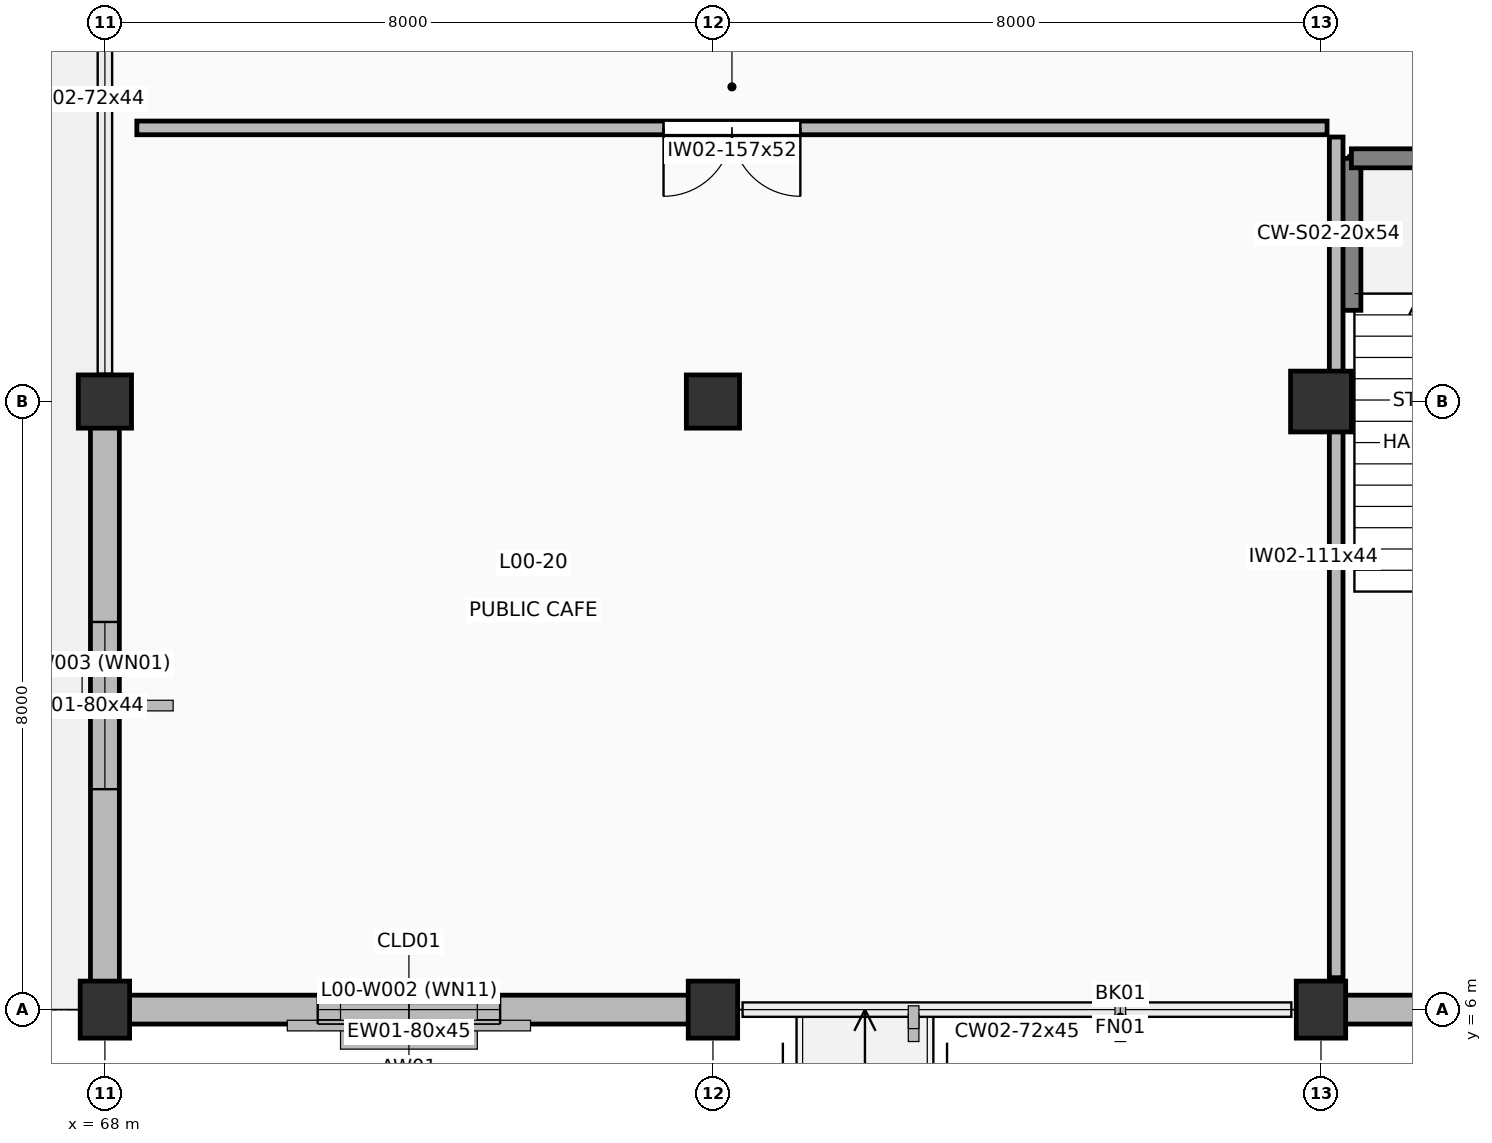
"""IFC4 building model, lengths in metres.
Left out: names, types, materials, properties, quantities, classifications, styles, units other than length and angle.
Written with IfcOpenShell. Run it as: python <this file> out.ifc"""

import sys

from ifc_helpers import new_model, si_unit, direction, frame, frame_2d, origin, origin_2d, place, context, subcontext, project, spatial, rectangle, extrude, element, fill, save


model = new_model("IFC4")
c1 = context("Model", 3, precision=1e-05, world=origin(), true_north=direction((0.0, 1.0)))
c2 = subcontext(c1, "Body", "Model", "MODEL_VIEW")
j1 = project(units=[si_unit("LENGTHUNIT", "METRE"), si_unit("PLANEANGLEUNIT", "RADIAN")], contexts=[c1])
p1 = place(None, origin())
s1 = spatial("IfcSite", under=j1, at=p1, CompositionType="ELEMENT")
p2 = place(p1, origin())
s2 = spatial("IfcBuilding", under=s1, at=p2, CompositionType="ELEMENT")
p3 = place(p2, origin())
s3 = spatial("IfcBuildingStorey", under=s2, at=p3, CompositionType="ELEMENT", Elevation=0.0)
p4 = place(p3, frame((68.0, 6.0, 0.0), z_axis=(0.0, 0.0, 1.0), x_axis=(1.0, 0.0, 0.0)))
e1 = element("IfcColumn", 1, at=p4, inside=s3, PredefinedType="PILASTER", context=c2, shape_type="SweptSolid", body=[
    extrude(rectangle(XDim=0.65, YDim=0.75, at=origin_2d()), origin(), (0.0, 0.0, 1.0), 5.4),
])
p5 = place(p3, frame((68.0, 14.0, 0.0), z_axis=(0.0, 0.0, 1.0), x_axis=(1.0, 0.0, 0.0)))
e2 = element("IfcColumn", 2, at=p5, inside=s3, PredefinedType="COLUMN", context=c2, shape_type="SweptSolid", body=[
    extrude(rectangle(XDim=0.7, YDim=0.7, at=origin_2d()), origin(), (0.0, 0.0, 1.0), 5.4),
])
p6 = place(p3, frame((76.0, 6.0, 0.0), z_axis=(0.0, 0.0, 1.0), x_axis=(1.0, 0.0, 0.0)))
e3 = element("IfcColumn", 3, at=p6, inside=s3, PredefinedType="PILASTER", context=c2, shape_type="SweptSolid", body=[
    extrude(rectangle(XDim=0.65, YDim=0.75, at=origin_2d()), origin(), (0.0, 0.0, 1.0), 5.4),
])
p7 = place(p3, frame((76.0, 14.0, 0.0), z_axis=(0.0, 0.0, 1.0), x_axis=(1.0, 0.0, 0.0)))
e4 = element("IfcColumn", 4, at=p7, inside=s3, PredefinedType="COLUMN", context=c2, shape_type="SweptSolid", body=[
    extrude(rectangle(XDim=0.7, YDim=0.7, at=origin_2d()), origin(), (0.0, 0.0, 1.0), 5.4),
])
p8 = place(p3, frame((84.0, 6.0, 0.0), z_axis=(0.0, 0.0, 1.0), x_axis=(1.0, 0.0, 0.0)))
e5 = element("IfcColumn", 5, at=p8, inside=s3, PredefinedType="PILASTER", context=c2, shape_type="SweptSolid", body=[
    extrude(rectangle(XDim=0.65, YDim=0.75, at=origin_2d()), origin(), (0.0, 0.0, 1.0), 5.4),
])
p9 = place(p3, frame((84.0, 14.0, 0.0), z_axis=(0.0, 0.0, 1.0), x_axis=(1.0, 0.0, 0.0)))
e6 = element("IfcColumn", 6, at=p9, inside=s3, PredefinedType="COLUMN", context=c2, shape_type="SweptSolid", body=[
    extrude(rectangle(XDim=0.8, YDim=0.8, at=origin_2d()), origin(), (0.0, 0.0, 1.0), 5.4),
])
p10 = place(p3, frame((91.077, 6.0, 0.0), z_axis=(0.0, 0.0, 1.0), x_axis=(-1.0, 0.0, 0.0)))
e7 = element("IfcWall", 7, at=p10, inside=s3, PredefinedType="SOLIDWALL", context=c2, shape_type="SweptSolid", body=[
    extrude(rectangle(XDim=7.077, YDim=0.38, at=frame_2d((3.539, 0.0))), origin(), (0.0, 0.0, 1.0), 4.495),
])
p11 = place(p10, frame((2.738, 0.0, 0.85)))
e8 = element("IfcOpeningElement", 8, at=p11, cuts=e7, PredefinedType="OPENING", context=c2, shape_type="SweptSolid", body=[
    extrude(rectangle(XDim=1.6, YDim=2.0, at=frame_2d((0.8, 1.0))), frame((0.0, 0.2, 0.0), z_axis=(0.0, -1.0, 0.0), x_axis=(1.0, 0.0, 0.0)), (0.0, 0.0, 1.0), 0.4),
])
p12 = place(p3, frame((76.0, 6.0, 0.0), z_axis=(0.0, 0.0, 1.0), x_axis=(-1.0, 0.0, 0.0)))
e9 = element("IfcWall", 9, at=p12, inside=s3, PredefinedType="SOLIDWALL", context=c2, shape_type="SweptSolid", body=[
    extrude(rectangle(XDim=8.0, YDim=0.38, at=frame_2d((4.0, 0.0))), origin(), (0.0, 0.0, 1.0), 4.495),
])
p13 = place(p12, frame((2.8, 0.0, 0.9)))
e10 = element("IfcOpeningElement", 10, at=p13, cuts=e9, PredefinedType="OPENING", context=c2, shape_type="SweptSolid", body=[
    extrude(rectangle(XDim=2.4, YDim=2.7, at=frame_2d((1.2, 1.35))), frame((0.0, 0.2, 0.0), z_axis=(0.0, -1.0, 0.0), x_axis=(1.0, 0.0, 0.0)), (0.0, 0.0, 1.0), 0.4),
])
p14 = place(p3, frame((68.0, 6.0, 0.0), z_axis=(0.0, 0.0, 1.0), x_axis=(0.0, 1.0, 0.0)))
e11 = element("IfcWall", 11, at=p14, inside=s3, PredefinedType="SOLIDWALL", context=c2, shape_type="SweptSolid", body=[
    extrude(rectangle(XDim=8.0, YDim=0.38, at=frame_2d((4.0, 0.0))), origin(), (0.0, 0.0, 1.0), 4.445),
])
p15 = place(p14, frame((2.9, 0.0, 0.85)))
e12 = element("IfcOpeningElement", 12, at=p15, cuts=e11, PredefinedType="OPENING", context=c2, shape_type="SweptSolid", body=[
    extrude(rectangle(XDim=2.2, YDim=2.8, at=frame_2d((1.1, 1.4))), frame((0.0, 0.2, 0.0), z_axis=(0.0, -1.0, 0.0), x_axis=(1.0, 0.0, 0.0)), (0.0, 0.0, 1.0), 0.4),
])
p16 = place(p3, frame((84.4, 15.2, 0.0), z_axis=(0.0, 0.0, 1.0), x_axis=(0.0, 1.0, 0.0)))
e13 = element("IfcWall", 13, at=p16, inside=s3, PredefinedType="SHEAR", context=c2, shape_type="SweptSolid", body=[
    extrude(rectangle(XDim=2.0, YDim=0.25, at=frame_2d((1.0, 0.0))), origin(), (0.0, 0.0, 1.0), 5.4),
])
p17 = place(p3, frame((84.4, 17.2, 0.0), z_axis=(0.0, 0.0, 1.0), x_axis=(1.0, 0.0, 0.0)))
e14 = element("IfcWall", 14, at=p17, inside=s3, PredefinedType="SHEAR", context=c2, shape_type="SweptSolid", body=[
    extrude(rectangle(XDim=4.8, YDim=0.25, at=frame_2d((2.4, 0.0))), origin(), (0.0, 0.0, 1.0), 5.4),
])
p18 = place(p3, frame((84.08, 17.6, 0.0), z_axis=(0.0, 0.0, 1.0), x_axis=(-1.0, 0.0, 0.0)))
e15 = element("IfcWall", 15, at=p18, inside=s3, PredefinedType="PARTITIONING", context=c2, shape_type="SweptSolid", body=[
    extrude(rectangle(XDim=15.66, YDim=0.18, at=frame_2d((7.83, 0.0))), origin(), (0.0, 0.0, 1.0), 5.16),
])
p19 = place(p18, frame((6.93, 0.0, 0.0)))
e16 = element("IfcOpeningElement", 16, at=p19, cuts=e15, PredefinedType="OPENING", context=c2, shape_type="SweptSolid", body=[
    extrude(rectangle(XDim=1.8, YDim=2.3, at=frame_2d((0.9, 1.15))), frame((0.0, 0.1, 0.0), z_axis=(0.0, -1.0, 0.0), x_axis=(1.0, 0.0, 0.0)), (0.0, 0.0, 1.0), 0.2),
])
p20 = place(p3, frame((84.2, 6.42, 0.0), z_axis=(0.0, 0.0, 1.0), x_axis=(0.0, 1.0, 0.0)))
e17 = element("IfcWall", 17, at=p20, inside=s3, PredefinedType="PARTITIONING", context=c2, shape_type="SweptSolid", body=[
    extrude(rectangle(XDim=11.06, YDim=0.18, at=frame_2d((5.53, 0.0))), origin(), (0.0, 0.0, 1.0), 4.445),
])
p21 = place(p13, origin())
e18 = element("IfcWindow", 18, at=p21, inside=s3, PartitioningType="DOUBLE_PANEL_VERTICAL", PredefinedType="WINDOW", context=c2, shape_type="SweptSolid", body=[
    extrude(rectangle(XDim=2.4, YDim=2.7, at=frame_2d((1.2, 1.35))), frame((0.0, 0.03, 0.0), z_axis=(0.0, -1.0, 0.0), x_axis=(1.0, 0.0, 0.0)), (0.0, 0.0, 1.0), 0.06),
])
fill(e10, e18)
p22 = place(p15, origin())
e19 = element("IfcWindow", 19, at=p22, inside=s3, PartitioningType="DOUBLE_PANEL_VERTICAL", PredefinedType="WINDOW", context=c2, shape_type="SweptSolid", body=[
    extrude(rectangle(XDim=2.2, YDim=2.8, at=frame_2d((1.1, 1.4))), frame((0.0, 0.03, 0.0), z_axis=(0.0, -1.0, 0.0), x_axis=(1.0, 0.0, 0.0)), (0.0, 0.0, 1.0), 0.06),
])
fill(e12, e19)
p23 = place(p19, origin())
e20 = element("IfcDoor", 20, at=p23, inside=s3, OperationType="DOUBLE_DOOR_SINGLE_SWING", PredefinedType="DOOR", context=c2, shape_type="SweptSolid", body=[
    extrude(rectangle(XDim=1.8, YDim=2.3, at=frame_2d((0.9, 1.15))), frame((0.0, 0.025, 0.0), z_axis=(0.0, -1.0, 0.0), x_axis=(1.0, 0.0, 0.0)), (0.0, 0.0, 1.0), 0.05),
])
fill(e16, e20)
save(model, sys.argv[1])
